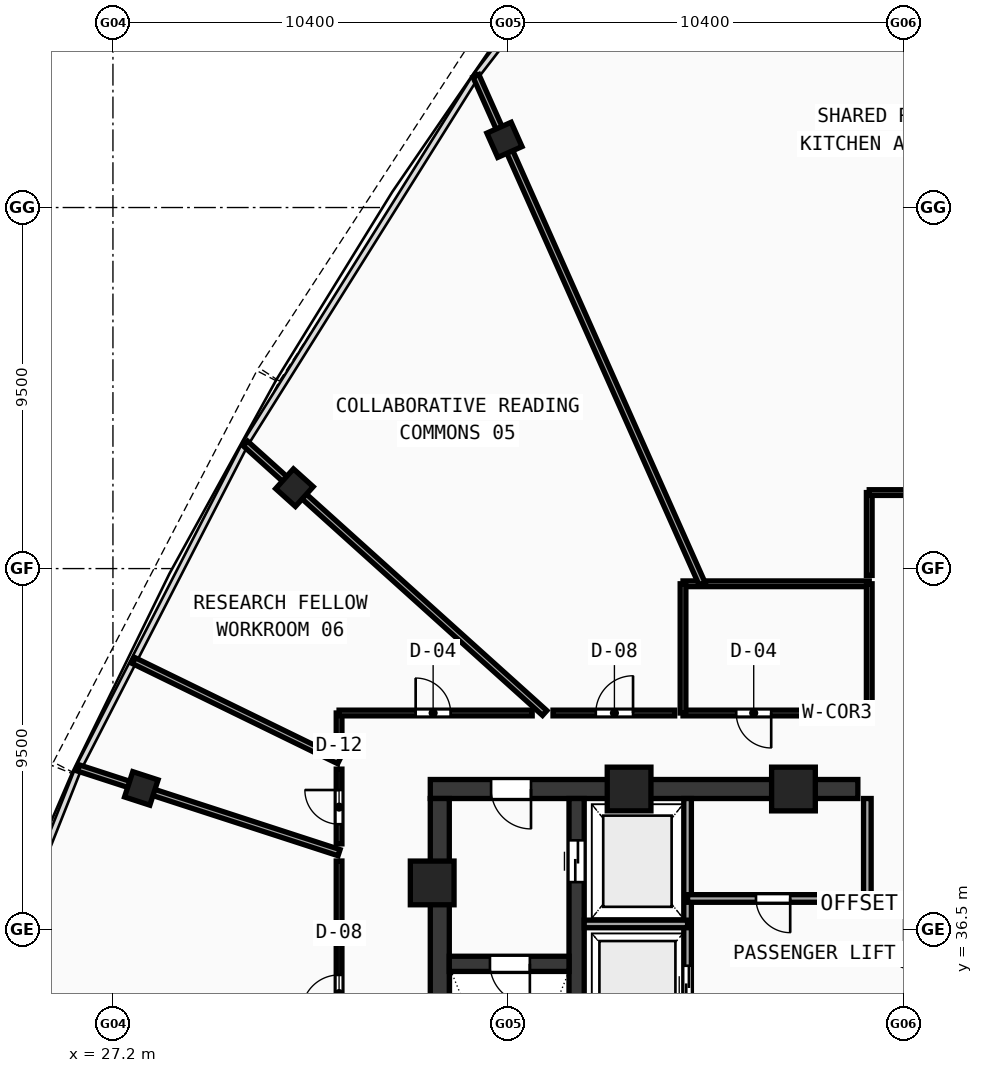
"""IFC4 building model, lengths in metres.
Left out: names, types, materials, properties, quantities, classifications, styles, units other than length and angle.
Written with IfcOpenShell. Run it as: python <this file> out.ifc"""

import sys

from ifc_helpers import new_model, si_unit, direction, frame, frame_2d, origin, origin_with_axes, origin_2d, place, context, subcontext, project, spatial, rectangle, hollow_rectangle, extrude, source, transform, mapped, element, fill, save


model = new_model("IFC4")
c1 = context("Model", 3, precision=1e-05, world=origin(), true_north=direction((0.0, 1.0)))
c2 = subcontext(c1, "Body", "Model", "MODEL_VIEW")
j1 = project(units=[si_unit("LENGTHUNIT", "METRE"), si_unit("PLANEANGLEUNIT", "RADIAN")], contexts=[c1])
p1 = place(None, origin())
s1 = spatial("IfcSite", under=j1, at=p1, CompositionType="ELEMENT")
p2 = place(p1, origin())
s2 = spatial("IfcBuilding", under=s1, at=p2, CompositionType="ELEMENT")
p3 = place(p2, frame((0.0, 0.0, 363.01)))
s3 = spatial("IfcBuildingStorey", under=s2, at=p3, CompositionType="ELEMENT", Elevation=363.01)
p4 = place(p3, frame((35.55, 40.2, 0.0), z_axis=(0.0, 0.0, 1.0), x_axis=(1.0, 0.0, 0.0)))
e1 = element("IfcWall", 1, at=p4, inside=s3, PredefinedType="SHEAR", context=c2, shape_type="SweptSolid", body=[
    extrude(rectangle(XDim=11.25, YDim=0.5, at=frame_2d((5.625, 0.0))), origin(), (0.0, 0.0, 1.0), 3.47),
])
p5 = place(p4, frame((1.6, 0.0, 0.0)))
e2 = element("IfcOpeningElement", 2, at=p5, cuts=e1, PredefinedType="OPENING", context=c2, shape_type="SweptSolid", body=[
    extrude(rectangle(XDim=1.05, YDim=2.1, at=frame_2d((0.525, 1.05))), frame((0.0, 0.26, 0.0), z_axis=(0.0, -1.0, 0.0), x_axis=(1.0, 0.0, 0.0)), (0.0, 0.0, 1.0), 0.52),
])
p6 = place(p3, frame((35.8, 27.75, 0.0), z_axis=(0.0, 0.0, 1.0), x_axis=(0.0, 1.0, 0.0)))
e3 = element("IfcWall", 3, at=p6, inside=s3, PredefinedType="SHEAR", context=c2, shape_type="SweptSolid", body=[
    extrude(rectangle(XDim=12.2, YDim=0.5, at=frame_2d((6.1, 0.0))), origin(), (0.0, 0.0, 1.0), 3.47),
])
p7 = place(p3, frame((39.4, 27.75, 0.0), z_axis=(0.0, 0.0, 1.0), x_axis=(0.0, 1.0, 0.0)))
e4 = element("IfcWall", 4, at=p7, inside=s3, PredefinedType="SHEAR", context=c2, shape_type="SweptSolid", body=[
    extrude(rectangle(XDim=12.2, YDim=0.4, at=frame_2d((6.1, 0.0))), origin(), (0.0, 0.0, 1.0), 3.47),
])
p8 = place(p7, frame((10.0, 0.0, 0.0)))
e5 = element("IfcOpeningElement", 5, at=p8, cuts=e4, PredefinedType="OPENING", context=c2, shape_type="SweptSolid", body=[
    extrude(rectangle(XDim=1.1, YDim=2.1, at=frame_2d((0.55, 1.05))), frame((0.0, 0.21, 0.0), z_axis=(0.0, -1.0, 0.0), x_axis=(1.0, 0.0, 0.0)), (0.0, 0.0, 1.0), 0.42),
])
p9 = place(p3, frame((36.05, 35.6, 0.0), z_axis=(0.0, 0.0, 1.0), x_axis=(1.0, 0.0, 0.0)))
e6 = element("IfcWall", 6, at=p9, inside=s3, PredefinedType="SHEAR", context=c2, shape_type="SweptSolid", body=[
    extrude(rectangle(XDim=3.15, YDim=0.4, at=frame_2d((1.575, 0.0))), origin(), (0.0, 0.0, 1.0), 3.47),
])
p10 = place(p9, frame((1.07, 0.0, 0.0)))
e7 = element("IfcOpeningElement", 7, at=p10, cuts=e6, PredefinedType="OPENING", context=c2, shape_type="SweptSolid", body=[
    extrude(rectangle(XDim=1.05, YDim=2.1, at=frame_2d((0.525, 1.05))), frame((0.0, 0.21, 0.0), z_axis=(0.0, -1.0, 0.0), x_axis=(1.0, 0.0, 0.0)), (0.0, 0.0, 1.0), 0.42),
])
m1 = source(origin(), c2, "Body", "SweptSolid", [
    extrude(hollow_rectangle(XDim=1.15, YDim=1.15, WallThickness=0.048, at=origin_2d()), origin(), (0.0, 0.0, 1.0), 3.73),
])
for number, where, z_axis, x_axis in (
    (8, (45.106, 40.2, -0.26), (0.0, 0.0, 1.0), (1.0, 0.0, 0.0)),
    (9, (40.781, 40.2, -0.26), (0.0, 0.0, 1.0), (1.0, 0.0, 0.0)),
    (10, (35.6, 37.729, -0.26), (0.0, 0.0, 1.0), (1.0, 0.0, 0.0)),
):
    element("IfcColumn", number, at=place(p3, frame(where, z_axis=z_axis, x_axis=x_axis)), inside=s3, PredefinedType="COLUMN", context=c2, shape_type="MappedRepresentation", body=[
        mapped(m1, transform((0.0, 0.0, 0.0), scale=1.0)),
    ])
m2 = source(origin(), c2, "Body", "SweptSolid", [
    extrude(hollow_rectangle(XDim=0.7, YDim=0.7, WallThickness=0.026, at=origin_2d()), origin(), (0.0, 0.0, 1.0), 3.73),
])
for number, where, z_axis, x_axis in (
    (11, (37.501, 57.281, -0.26), (0.0, 0.0, 1.0), (-0.914, -0.407, 0.0)),
    (12, (31.975, 48.129, -0.26), (0.0, 0.0, 1.0), (-0.669, -0.743, 0.0)),
    (13, (27.947, 40.216, -0.26), (0.0, 0.0, 1.0), (-0.309, -0.951, 0.0)),
):
    element("IfcColumn", number, at=place(p3, frame(where, z_axis=z_axis, x_axis=x_axis)), inside=s3, PredefinedType="COLUMN", context=c2, shape_type="MappedRepresentation", body=[
        mapped(m2, transform((0.0, 0.0, 0.0), scale=1.0)),
    ])
p11 = place(p3, frame((42.32, 33.5, 0.0), z_axis=(0.0, 0.0, 1.0), x_axis=(0.0, 1.0, 0.0)))
e14 = element("IfcWall", 14, at=p11, inside=s3, PredefinedType="SOLIDWALL", context=c2, shape_type="SweptSolid", body=[
    extrude(rectangle(XDim=6.45, YDim=0.2, at=frame_2d((3.225, 0.0))), origin(), (0.0, 0.0, 1.0), 3.47),
])
p12 = place(p11, frame((1.0, 0.0, 0.0)))
e15 = element("IfcOpeningElement", 15, at=p12, cuts=e14, PredefinedType="OPENING", context=c2, shape_type="SweptSolid", body=[
    extrude(rectangle(XDim=1.05, YDim=2.1, at=frame_2d((0.525, 1.05))), frame((0.0, 0.11, 0.0), z_axis=(0.0, -1.0, 0.0), x_axis=(1.0, 0.0, 0.0)), (0.0, 0.0, 1.0), 0.22),
])
p13 = place(p3, frame((39.6, 36.65, 0.0), z_axis=(0.0, 0.0, 1.0), x_axis=(1.0, 0.0, 0.0)))
e16 = element("IfcWall", 16, at=p13, inside=s3, PredefinedType="SOLIDWALL", context=c2, shape_type="SweptSolid", body=[
    extrude(rectangle(XDim=2.72, YDim=0.2, at=frame_2d((1.36, 0.0))), origin(), (0.0, 0.0, 1.0), 3.47),
])
p14 = place(p3, frame((42.32, 37.32, 0.0), z_axis=(0.0, 0.0, 1.0), x_axis=(1.0, 0.0, 0.0)))
e17 = element("IfcWall", 17, at=p14, inside=s3, PredefinedType="SOLIDWALL", context=c2, shape_type="SweptSolid", body=[
    extrude(rectangle(XDim=4.73, YDim=0.2, at=frame_2d((2.365, 0.0))), origin(), (0.0, 0.0, 1.0), 3.47),
])
p15 = place(p14, frame((1.8, 0.0, 0.0)))
e18 = element("IfcOpeningElement", 18, at=p15, cuts=e17, PredefinedType="OPENING", context=c2, shape_type="SweptSolid", body=[
    extrude(rectangle(XDim=0.9, YDim=2.1, at=frame_2d((0.45, 1.05))), frame((0.0, 0.11, 0.0), z_axis=(0.0, -1.0, 0.0), x_axis=(1.0, 0.0, 0.0)), (0.0, 0.0, 1.0), 0.22),
])
p16 = place(p3, frame((47.05, 37.32, 0.0), z_axis=(0.0, 0.0, 1.0), x_axis=(0.0, 1.0, 0.0)))
e19 = element("IfcWall", 19, at=p16, inside=s3, PredefinedType="SOLIDWALL", context=c2, shape_type="SweptSolid", body=[
    extrude(rectangle(XDim=2.63, YDim=0.2, at=frame_2d((1.315, 0.0))), origin(), (0.0, 0.0, 1.0), 3.47),
])
p17 = place(p3, frame((42.2, 42.2, 0.0), z_axis=(0.0, 0.0, 1.0), x_axis=(1.0, 0.0, 0.0)))
e20 = element("IfcWall", 20, at=p17, inside=s3, PredefinedType="PARTITIONING", context=c2, shape_type="SweptSolid", body=[
    extrude(rectangle(XDim=4.9, YDim=0.15, at=frame_2d((2.45, 0.0))), origin(), (0.0, 0.0, 1.0), 2.87),
])
p18 = place(p17, frame((1.4, 0.0, 0.0)))
e21 = element("IfcOpeningElement", 21, at=p18, cuts=e20, PredefinedType="OPENING", context=c2, shape_type="SweptSolid", body=[
    extrude(rectangle(XDim=0.92, YDim=2.1, at=frame_2d((0.46, 1.05))), frame((0.0, 0.085, 0.0), z_axis=(0.0, -1.0, 0.0), x_axis=(1.0, 0.0, 0.0)), (0.0, 0.0, 1.0), 0.17),
])
p19 = place(p3, frame((42.2, 45.6, 0.0), z_axis=(0.0, 0.0, 1.0), x_axis=(1.0, 0.0, 0.0)))
e22 = element("IfcWall", 22, at=p19, inside=s3, PredefinedType="PARTITIONING", context=c2, shape_type="SweptSolid", body=[
    extrude(rectangle(XDim=4.9, YDim=0.15, at=frame_2d((2.45, 0.0))), origin(), (0.0, 0.0, 1.0), 2.87),
])
for number, where, z_axis, x_axis in (
    (23, (42.2, 42.2, 0.0), (0.0, 0.0, 1.0), (0.0, 1.0, 0.0)),
    (24, (47.1, 42.2, 0.0), (0.0, 0.0, 1.0), (0.0, 1.0, 0.0)),
):
    element("IfcWall", number, at=place(p3, frame(where, z_axis=z_axis, x_axis=x_axis)), inside=s3, PredefinedType="PARTITIONING", context=c2, shape_type="SweptSolid", body=[
        extrude(rectangle(XDim=3.4, YDim=0.15, at=frame_2d((1.7, 0.0))), origin(), (0.0, 0.0, 1.0), 3.47),
    ])
p20 = place(p3, frame((42.702, 45.6, 0.0), z_axis=(0.0, 0.0, 1.0), x_axis=(-0.406749951551, 0.913539532212, 0.0)))
e25 = element("IfcWall", 25, at=p20, inside=s3, PredefinedType="PARTITIONING", context=c2, shape_type="SweptSolid", body=[
    extrude(rectangle(XDim=14.63, YDim=0.17, at=frame_2d((7.315, 0.0))), origin(), (0.0, 0.0, 1.0), 2.87),
])
p21 = place(p3, frame((38.56, 42.2, 0.0), z_axis=(0.0, 0.0, 1.0), x_axis=(-0.743152066897, 0.66912256386, 0.0)))
e26 = element("IfcWall", 26, at=p21, inside=s3, PredefinedType="PARTITIONING", context=c2, shape_type="SweptSolid", body=[
    extrude(rectangle(XDim=10.596, YDim=0.17, at=frame_2d((5.298, 0.0))), origin(), (0.0, 0.0, 1.0), 2.87),
])
p22 = place(p3, frame((33.15, 40.943, 0.0), z_axis=(0.0, 0.0, 1.0), x_axis=(-0.898803189206, 0.438352400557, 0.0)))
e27 = element("IfcWall", 27, at=p22, inside=s3, PredefinedType="PARTITIONING", context=c2, shape_type="SweptSolid", body=[
    extrude(rectangle(XDim=6.01, YDim=0.17, at=frame_2d((3.005, 0.0))), origin(), (0.0, 0.0, 1.0), 2.87),
])
p23 = place(p3, frame((33.15, 38.525, 0.0), z_axis=(0.0, 0.0, 1.0), x_axis=(-0.951060950279, 0.309003347644, 0.0)))
e28 = element("IfcWall", 28, at=p23, inside=s3, PredefinedType="PARTITIONING", context=c2, shape_type="SweptSolid", body=[
    extrude(rectangle(XDim=7.207, YDim=0.17, at=frame_2d((3.604, 0.0))), origin(), (0.0, 0.0, 1.0), 2.87),
])
p24 = place(p3, frame((33.15, 31.301, 0.0), z_axis=(0.0, 0.0, 1.0), x_axis=(0.0, 1.0, 0.0)))
e29 = element("IfcWall", 29, at=p24, inside=s3, PredefinedType="PARTITIONING", context=c2, shape_type="SweptSolid", body=[
    extrude(rectangle(XDim=7.004, YDim=0.15, at=frame_2d((3.502, 0.0))), origin(), (0.0, 0.0, 1.0), 3.47),
])
p25 = place(p24, frame((3.027, 0.0, 0.0)))
e30 = element("IfcOpeningElement", 30, at=p25, cuts=e29, PredefinedType="OPENING", context=c2, shape_type="SweptSolid", body=[
    extrude(rectangle(XDim=0.98, YDim=2.12, at=frame_2d((0.49, 1.06))), frame((0.0, 0.085, 0.0), z_axis=(0.0, -1.0, 0.0), x_axis=(1.0, 0.0, 0.0)), (0.0, 0.0, 1.0), 0.17),
])
p26 = place(p3, frame((33.15, 38.756, 0.0), z_axis=(0.0, 0.0, 1.0), x_axis=(0.0, 1.0, 0.0)))
e31 = element("IfcWall", 31, at=p26, inside=s3, PredefinedType="PARTITIONING", context=c2, shape_type="SweptSolid", body=[
    extrude(rectangle(XDim=1.967, YDim=0.15, at=frame_2d((0.983, 0.0))), origin(), (0.0, 0.0, 1.0), 3.12),
])
p27 = place(p26, frame((0.518, 0.0, 0.0)))
e32 = element("IfcOpeningElement", 32, at=p27, cuts=e31, PredefinedType="OPENING", context=c2, shape_type="SweptSolid", body=[
    extrude(rectangle(XDim=0.9, YDim=2.08, at=frame_2d((0.45, 1.04))), frame((0.0, 0.085, 0.0), z_axis=(0.0, -1.0, 0.0), x_axis=(1.0, 0.0, 0.0)), (0.0, 0.0, 1.0), 0.17),
])
p28 = place(p3, frame((33.15, 41.188, 0.0), z_axis=(0.0, 0.0, 1.0), x_axis=(0.0, 1.0, 0.0)))
e33 = element("IfcWall", 33, at=p28, inside=s3, PredefinedType="PARTITIONING", context=c2, shape_type="SweptSolid", body=[
    extrude(rectangle(XDim=1.012, YDim=0.15, at=frame_2d((0.506, 0.0))), origin(), (0.0, 0.0, 1.0), 3.47),
])
p29 = place(p3, frame((33.15, 42.2, 0.0), z_axis=(0.0, 0.0, 1.0), x_axis=(1.0, 0.0, 0.0)))
e34 = element("IfcWall", 34, at=p29, inside=s3, PredefinedType="PARTITIONING", context=c2, shape_type="SweptSolid", body=[
    extrude(rectangle(XDim=5.081, YDim=0.15, at=frame_2d((2.541, 0.0))), origin(), (0.0, 0.0, 1.0), 3.12),
])
p30 = place(p29, frame((2.015, 0.0, 0.0)))
e35 = element("IfcOpeningElement", 35, at=p30, cuts=e34, PredefinedType="OPENING", context=c2, shape_type="SweptSolid", body=[
    extrude(rectangle(XDim=0.92, YDim=2.1, at=frame_2d((0.46, 1.05))), frame((0.0, 0.085, 0.0), z_axis=(0.0, -1.0, 0.0), x_axis=(1.0, 0.0, 0.0)), (0.0, 0.0, 1.0), 0.17),
])
p31 = place(p3, frame((38.78, 42.2, 0.0), z_axis=(0.0, 0.0, 1.0), x_axis=(1.0, 0.0, 0.0)))
e36 = element("IfcWall", 36, at=p31, inside=s3, PredefinedType="PARTITIONING", context=c2, shape_type="SweptSolid", body=[
    extrude(rectangle(XDim=3.2, YDim=0.15, at=frame_2d((1.6, 0.0))), origin(), (0.0, 0.0, 1.0), 2.87),
])
p32 = place(p31, frame((1.125, 0.0, 0.0)))
e37 = element("IfcOpeningElement", 37, at=p32, cuts=e36, PredefinedType="OPENING", context=c2, shape_type="SweptSolid", body=[
    extrude(rectangle(XDim=0.98, YDim=2.12, at=frame_2d((0.49, 1.06))), frame((0.0, 0.085, 0.0), z_axis=(0.0, -1.0, 0.0), x_axis=(1.0, 0.0, 0.0)), (0.0, 0.0, 1.0), 0.17),
])
p33 = place(p3, frame((47.1, 45.82, 0.0), z_axis=(0.0, 0.0, 1.0), x_axis=(0.0, 1.0, 0.0)))
e38 = element("IfcWall", 38, at=p33, inside=s3, PredefinedType="PARTITIONING", context=c2, shape_type="SweptSolid", body=[
    extrude(rectangle(XDim=2.18, YDim=0.15, at=frame_2d((1.09, 0.0))), origin(), (0.0, 0.0, 1.0), 3.12),
])
p34 = place(p3, frame((47.1, 48.0, 0.0), z_axis=(0.0, 0.0, 1.0), x_axis=(1.0, 0.0, 0.0)))
e39 = element("IfcWall", 39, at=p34, inside=s3, PredefinedType="PARTITIONING", context=c2, shape_type="SweptSolid", body=[
    extrude(rectangle(XDim=1.8, YDim=0.15, at=frame_2d((0.9, 0.0))), origin(), (0.0, 0.0, 1.0), 3.47),
])
m3 = source(origin(), c2, "Body", "SweptSolid", [
    extrude(rectangle(XDim=1.05, YDim=2.1, at=frame_2d((0.525, 1.05))), frame((0.0, 0.025, 0.0), z_axis=(0.0, -1.0, 0.0), x_axis=(1.0, 0.0, 0.0)), (0.0, 0.0, 1.0), 0.05),
])
p35 = place(p10, frame((1.05, 0.0, 0.0), z_axis=(0.0, 0.0, 1.0), x_axis=(-1.0, 0.0, 0.0)))
e40 = element("IfcDoor", 40, at=p35, inside=s3, OperationType="SINGLE_SWING_LEFT", PredefinedType="DOOR", context=c2, shape_type="MappedRepresentation", body=[
    mapped(m3, transform((0.0, 0.0, 0.0), scale=1.0)),
])
fill(e7, e40)
p36 = place(p5, frame((1.05, 0.0, 0.0), z_axis=(0.0, 0.0, 1.0), x_axis=(-1.0, 0.0, 0.0)))
e41 = element("IfcDoor", 41, at=p36, inside=s3, OperationType="SINGLE_SWING_LEFT", PredefinedType="DOOR", context=c2, shape_type="MappedRepresentation", body=[
    mapped(m3, transform((0.0, 0.0, 0.0), scale=1.0)),
])
fill(e2, e41)
m4 = source(origin(), c2, "Body", "SweptSolid", [
    extrude(rectangle(XDim=1.1, YDim=2.1, at=frame_2d((0.55, 1.05))), frame((0.0, 0.025, 0.0), z_axis=(0.0, -1.0, 0.0), x_axis=(1.0, 0.0, 0.0)), (0.0, 0.0, 1.0), 0.05),
])
p37 = place(p8, frame((1.1, 0.0, 0.0), z_axis=(0.0, 0.0, 1.0), x_axis=(-1.0, 0.0, 0.0)))
e42 = element("IfcDoor", 42, at=p37, inside=s3, OperationType="DOUBLE_DOOR_SLIDING", PredefinedType="DOOR", context=c2, shape_type="MappedRepresentation", body=[
    mapped(m4, transform((0.0, 0.0, 0.0), scale=1.0)),
])
fill(e5, e42)
p38 = place(p12, origin_with_axes())
e43 = element("IfcDoor", 43, at=p38, inside=s3, OperationType="DOUBLE_DOOR_SLIDING", PredefinedType="DOOR", context=c2, shape_type="MappedRepresentation", body=[
    mapped(m3, transform((0.0, 0.0, 0.0), scale=1.0)),
])
fill(e15, e43)
m5 = source(origin(), c2, "Body", "SweptSolid", [
    extrude(rectangle(XDim=0.9, YDim=2.1, at=frame_2d((0.45, 1.05))), frame((0.0, 0.025, 0.0), z_axis=(0.0, -1.0, 0.0), x_axis=(1.0, 0.0, 0.0)), (0.0, 0.0, 1.0), 0.05),
])
p39 = place(p15, frame((0.9, 0.0, 0.0), z_axis=(0.0, 0.0, 1.0), x_axis=(-1.0, 0.0, 0.0)))
e44 = element("IfcDoor", 44, at=p39, inside=s3, OperationType="SINGLE_SWING_LEFT", PredefinedType="DOOR", context=c2, shape_type="MappedRepresentation", body=[
    mapped(m5, transform((0.0, 0.0, 0.0), scale=1.0)),
])
fill(e18, e44)
m6 = source(origin(), c2, "Body", "SweptSolid", [
    extrude(rectangle(XDim=0.92, YDim=2.1, at=frame_2d((0.46, 1.05))), frame((0.0, 0.025, 0.0), z_axis=(0.0, -1.0, 0.0), x_axis=(1.0, 0.0, 0.0)), (0.0, 0.0, 1.0), 0.05),
])
p40 = place(p18, frame((0.92, 0.0, 0.0), z_axis=(0.0, 0.0, 1.0), x_axis=(-1.0, 0.0, 0.0)))
e45 = element("IfcDoor", 45, at=p40, inside=s3, OperationType="SINGLE_SWING_LEFT", PredefinedType="DOOR", context=c2, shape_type="MappedRepresentation", body=[
    mapped(m6, transform((0.0, 0.0, 0.0), scale=1.0)),
])
fill(e21, e45)
m7 = source(origin(), c2, "Body", "SweptSolid", [
    extrude(rectangle(XDim=0.98, YDim=2.12, at=frame_2d((0.49, 1.06))), frame((0.0, 0.025, 0.0), z_axis=(0.0, -1.0, 0.0), x_axis=(1.0, 0.0, 0.0)), (0.0, 0.0, 1.0), 0.05),
])
p41 = place(p32, origin_with_axes())
e46 = element("IfcDoor", 46, at=p41, inside=s3, OperationType="SINGLE_SWING_RIGHT", PredefinedType="DOOR", context=c2, shape_type="MappedRepresentation", body=[
    mapped(m7, transform((0.0, 0.0, 0.0), scale=1.0)),
])
fill(e37, e46)
p42 = place(p30, origin_with_axes())
e47 = element("IfcDoor", 47, at=p42, inside=s3, OperationType="SINGLE_SWING_LEFT", PredefinedType="DOOR", context=c2, shape_type="MappedRepresentation", body=[
    mapped(m6, transform((0.0, 0.0, 0.0), scale=1.0)),
])
fill(e35, e47)
m8 = source(origin(), c2, "Body", "SweptSolid", [
    extrude(rectangle(XDim=0.9, YDim=2.08, at=frame_2d((0.45, 1.04))), frame((0.0, 0.025, 0.0), z_axis=(0.0, -1.0, 0.0), x_axis=(1.0, 0.0, 0.0)), (0.0, 0.0, 1.0), 0.05),
])
p43 = place(p27, origin_with_axes())
e48 = element("IfcDoor", 48, at=p43, inside=s3, OperationType="SINGLE_SWING_RIGHT", PredefinedType="DOOR", context=c2, shape_type="MappedRepresentation", body=[
    mapped(m8, transform((0.0, 0.0, 0.0), scale=1.0)),
])
fill(e32, e48)
p44 = place(p25, origin_with_axes())
e49 = element("IfcDoor", 49, at=p44, inside=s3, OperationType="SINGLE_SWING_LEFT", PredefinedType="DOOR", context=c2, shape_type="MappedRepresentation", body=[
    mapped(m7, transform((0.0, 0.0, 0.0), scale=1.0)),
])
fill(e30, e49)
save(model, sys.argv[1])
